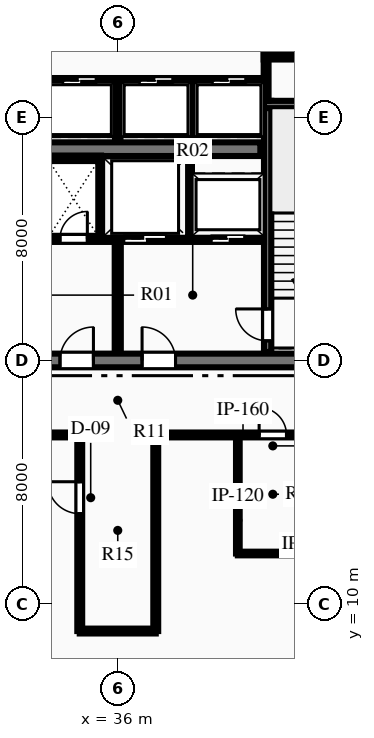
"""IFC4 building model, lengths in metres.
Left out: names, types, materials, properties, quantities, classifications, styles, units other than length and angle.
Written with IfcOpenShell. Run it as: python <this file> out.ifc"""

import sys

from ifc_helpers import new_model, si_unit, direction, frame, frame_2d, origin, place, context, subcontext, project, spatial, rectangle, extrude, element, fill, save


model = new_model("IFC4")
c1 = context("Model", 3, precision=1e-05, world=origin(), true_north=direction((0.0, 1.0)))
c2 = subcontext(c1, "Body", "Model", "MODEL_VIEW")
j1 = project(units=[si_unit("LENGTHUNIT", "METRE"), si_unit("PLANEANGLEUNIT", "RADIAN")], contexts=[c1])
p1 = place(None, origin())
s1 = spatial("IfcSite", under=j1, at=p1, CompositionType="ELEMENT")
p2 = place(p1, origin())
s2 = spatial("IfcBuilding", under=s1, at=p2, CompositionType="ELEMENT")
p3 = place(p2, frame((0.0, 0.0, 302.7)))
s3 = spatial("IfcBuildingStorey", under=s2, at=p3, CompositionType="ELEMENT", Elevation=302.7)
p4 = place(p3, frame((26.775, 18.0, 0.0), z_axis=(0.0, 0.0, 1.0), x_axis=(1.0, 0.0, 0.0)))
e1 = element("IfcWall", 1, at=p4, inside=s3, PredefinedType="SHEAR", context=c2, shape_type="SweptSolid", body=[
    extrude(rectangle(XDim=18.45, YDim=0.45, at=frame_2d((9.225, 0.0))), origin(), (0.0, 0.0, 1.0), 3.75),
])
p5 = place(p4, frame((7.325, 0.0, 0.0)))
e2 = element("IfcOpeningElement", 2, at=p5, cuts=e1, PredefinedType="OPENING", context=c2, shape_type="SweptSolid", body=[
    extrude(rectangle(XDim=1.1, YDim=2.15, at=frame_2d((0.55, 1.075))), frame((0.0, 0.235, 0.0), z_axis=(0.0, -1.0, 0.0), x_axis=(1.0, 0.0, 0.0)), (0.0, 0.0, 1.0), 0.47),
])
p6 = place(p4, frame((10.025, 0.0, 0.0)))
e3 = element("IfcOpeningElement", 3, at=p6, cuts=e1, PredefinedType="OPENING", context=c2, shape_type="SweptSolid", body=[
    extrude(rectangle(XDim=1.1, YDim=2.15, at=frame_2d((0.55, 1.075))), frame((0.0, 0.235, 0.0), z_axis=(0.0, -1.0, 0.0), x_axis=(1.0, 0.0, 0.0)), (0.0, 0.0, 1.0), 0.47),
])
p7 = place(p3, frame((31.31, 24.95, 0.0), z_axis=(0.0, 0.0, 1.0), x_axis=(1.0, 0.0, 0.0)))
e4 = element("IfcWall", 4, at=p7, inside=s3, PredefinedType="SHEAR", context=c2, shape_type="SweptSolid", body=[
    extrude(rectangle(XDim=9.38, YDim=0.45, at=frame_2d((4.69, 0.0))), origin(), (0.0, 0.0, 1.0), 3.75),
])
p8 = place(p3, frame((40.93, 18.28, 0.0), z_axis=(0.0, 0.0, 1.0), x_axis=(0.0, 1.0, 0.0)))
e5 = element("IfcWall", 5, at=p8, inside=s3, PredefinedType="SHEAR", context=c2, shape_type="SweptSolid", body=[
    extrude(rectangle(XDim=8.26, YDim=0.24, at=frame_2d((4.13, 0.0))), origin(), (0.0, 0.0, 1.0), 3.75),
])
p9 = place(p8, frame((0.365, 0.0, 0.0)))
e6 = element("IfcOpeningElement", 6, at=p9, cuts=e5, PredefinedType="OPENING", context=c2, shape_type="SweptSolid", body=[
    extrude(rectangle(XDim=1.05, YDim=2.15, at=frame_2d((0.525, 1.075))), frame((0.0, 0.13, 0.0), z_axis=(0.0, -1.0, 0.0), x_axis=(1.0, 0.0, 0.0)), (0.0, 0.0, 1.0), 0.26),
])
p10 = place(p3, frame((40.81, 26.42, 0.0), z_axis=(0.0, 0.0, 1.0), x_axis=(1.0, 0.0, 0.0)))
e7 = element("IfcWall", 7, at=p10, inside=s3, PredefinedType="SHEAR", context=c2, shape_type="SweptSolid", body=[
    extrude(rectangle(XDim=3.98, YDim=0.24, at=frame_2d((1.99, 0.0))), origin(), (0.0, 0.0, 1.0), 3.75),
])
p11 = place(p3, frame((36.0, 18.28, 0.0), z_axis=(0.0, 0.0, 1.0), x_axis=(0.0, 1.0, 0.0)))
e8 = element("IfcWall", 8, at=p11, inside=s3, PredefinedType="PARTITIONING", context=c2, shape_type="SweptSolid", body=[
    extrude(rectangle(XDim=3.77, YDim=0.2, at=frame_2d((1.885, 0.0))), origin(), (0.0, 0.0, 1.0), 3.49),
])
p12 = place(p3, frame((31.19, 22.0, 0.0), z_axis=(0.0, 0.0, 1.0), x_axis=(1.0, 0.0, 0.0)))
e9 = element("IfcWall", 9, at=p12, inside=s3, PredefinedType="PARTITIONING", context=c2, shape_type="SweptSolid", body=[
    extrude(rectangle(XDim=4.69, YDim=0.2, at=frame_2d((2.345, 0.0))), origin(), (0.0, 0.0, 1.0), 3.49),
])
p13 = place(p12, frame((2.91, 0.0, 0.0)))
e10 = element("IfcOpeningElement", 10, at=p13, cuts=e9, PredefinedType="OPENING", context=c2, shape_type="SweptSolid", body=[
    extrude(rectangle(XDim=0.9, YDim=2.15, at=frame_2d((0.45, 1.075))), frame((0.0, 0.11, 0.0), z_axis=(0.0, -1.0, 0.0), x_axis=(1.0, 0.0, 0.0)), (0.0, 0.0, 1.0), 0.22),
])
p14 = place(p12, frame((0.635, 0.0, 0.0)))
e11 = element("IfcOpeningElement", 11, at=p14, cuts=e9, PredefinedType="OPENING", context=c2, shape_type="SweptSolid", body=[
    extrude(rectangle(XDim=1.1, YDim=2.15, at=frame_2d((0.55, 1.075))), frame((0.0, 0.11, 0.0), z_axis=(0.0, -1.0, 0.0), x_axis=(1.0, 0.0, 0.0)), (0.0, 0.0, 1.0), 0.22),
])
p15 = place(p3, frame((36.12, 22.0, 0.0), z_axis=(0.0, 0.0, 1.0), x_axis=(1.0, 0.0, 0.0)))
e12 = element("IfcWall", 12, at=p15, inside=s3, PredefinedType="PARTITIONING", context=c2, shape_type="SweptSolid", body=[
    extrude(rectangle(XDim=4.69, YDim=0.2, at=frame_2d((2.345, 0.0))), origin(), (0.0, 0.0, 1.0), 3.49),
])
p16 = place(p15, frame((2.955, 0.0, 0.0)))
e13 = element("IfcOpeningElement", 13, at=p16, cuts=e12, PredefinedType="OPENING", context=c2, shape_type="SweptSolid", body=[
    extrude(rectangle(XDim=1.1, YDim=2.15, at=frame_2d((0.55, 1.075))), frame((0.0, 0.11, 0.0), z_axis=(0.0, -1.0, 0.0), x_axis=(1.0, 0.0, 0.0)), (0.0, 0.0, 1.0), 0.22),
])
p17 = place(p15, frame((0.08, 0.0, 0.0)))
e14 = element("IfcOpeningElement", 14, at=p17, cuts=e12, PredefinedType="OPENING", context=c2, shape_type="SweptSolid", body=[
    extrude(rectangle(XDim=1.4, YDim=2.2, at=frame_2d((0.7, 1.1))), frame((0.0, 0.11, 0.0), z_axis=(0.0, -1.0, 0.0), x_axis=(1.0, 0.0, 0.0)), (0.0, 0.0, 1.0), 0.22),
])
p18 = place(p3, frame((35.45, 22.05, 0.0), z_axis=(0.0, 0.0, 1.0), x_axis=(0.0, 1.0, 0.0)))
e15 = element("IfcWall", 15, at=p18, inside=s3, PredefinedType="PARTITIONING", context=c2, shape_type="SweptSolid", body=[
    extrude(rectangle(XDim=2.6, YDim=0.18, at=frame_2d((1.3, 0.0))), origin(), (0.0, 0.0, 1.0), 3.49),
])
p19 = place(p3, frame((33.65, 24.65, 0.0), z_axis=(0.0, 0.0, 1.0), x_axis=(1.0, 0.0, 0.0)))
e16 = element("IfcWall", 16, at=p19, inside=s3, PredefinedType="PARTITIONING", context=c2, shape_type="SweptSolid", body=[
    extrude(rectangle(XDim=1.8, YDim=0.18, at=frame_2d((0.9, 0.0))), origin(), (0.0, 0.0, 1.0), 3.49),
])
p20 = place(p3, frame((38.35, 22.05, 0.0), z_axis=(0.0, 0.0, 1.0), x_axis=(0.0, 1.0, 0.0)))
e17 = element("IfcWall", 17, at=p20, inside=s3, PredefinedType="PARTITIONING", context=c2, shape_type="SweptSolid", body=[
    extrude(rectangle(XDim=2.6, YDim=0.18, at=frame_2d((1.3, 0.0))), origin(), (0.0, 0.0, 1.0), 3.49),
])
p21 = place(p3, frame((40.8, 27.98, 0.0), z_axis=(0.0, 0.0, 1.0), x_axis=(1.0, 0.0, 0.0)))
e18 = element("IfcWall", 18, at=p21, inside=s3, PredefinedType="PARTITIONING", context=c2, shape_type="SweptSolid", body=[
    extrude(rectangle(XDim=4.05, YDim=0.16, at=frame_2d((2.025, 0.0))), origin(), (0.0, 0.0, 1.0), 3.49),
])
p22 = place(p21, frame((1.475, 0.0, 0.0)))
e19 = element("IfcOpeningElement", 19, at=p22, cuts=e18, PredefinedType="OPENING", context=c2, shape_type="SweptSolid", body=[
    extrude(rectangle(XDim=0.95, YDim=2.15, at=frame_2d((0.475, 1.075))), frame((0.0, 0.09, 0.0), z_axis=(0.0, -1.0, 0.0), x_axis=(1.0, 0.0, 0.0)), (0.0, 0.0, 1.0), 0.18),
])
p23 = place(p3, frame((40.88, 26.54, 0.0), z_axis=(0.0, 0.0, 1.0), x_axis=(0.0, 1.0, 0.0)))
e20 = element("IfcWall", 20, at=p23, inside=s3, PredefinedType="PARTITIONING", context=c2, shape_type="SweptSolid", body=[
    extrude(rectangle(XDim=1.51, YDim=0.16, at=frame_2d((0.755, 0.0))), origin(), (0.0, 0.0, 1.0), 3.49),
])
p24 = place(p3, frame((31.2, 27.2, 0.0), z_axis=(0.0, 0.0, 1.0), x_axis=(1.0, 0.0, 0.0)))
e21 = element("IfcWall", 21, at=p24, inside=s3, PredefinedType="PARTITIONING", context=c2, shape_type="SweptSolid", body=[
    extrude(rectangle(XDim=9.6, YDim=0.18, at=frame_2d((4.8, 0.0))), origin(), (0.0, 0.0, 1.0), 3.49),
])
p25 = place(p24, frame((0.59, 0.0, 0.0)))
e22 = element("IfcOpeningElement", 22, at=p25, cuts=e21, PredefinedType="OPENING", context=c2, shape_type="SweptSolid", body=[
    extrude(rectangle(XDim=1.1, YDim=2.15, at=frame_2d((0.55, 1.075))), frame((0.0, 0.1, 0.0), z_axis=(0.0, -1.0, 0.0), x_axis=(1.0, 0.0, 0.0)), (0.0, 0.0, 1.0), 0.2),
])
p26 = place(p24, frame((2.99, 0.0, 0.0)))
e23 = element("IfcOpeningElement", 23, at=p26, cuts=e21, PredefinedType="OPENING", context=c2, shape_type="SweptSolid", body=[
    extrude(rectangle(XDim=1.1, YDim=2.15, at=frame_2d((0.55, 1.075))), frame((0.0, 0.1, 0.0), z_axis=(0.0, -1.0, 0.0), x_axis=(1.0, 0.0, 0.0)), (0.0, 0.0, 1.0), 0.2),
])
p27 = place(p24, frame((5.51, 0.0, 0.0)))
e24 = element("IfcOpeningElement", 24, at=p27, cuts=e21, PredefinedType="OPENING", context=c2, shape_type="SweptSolid", body=[
    extrude(rectangle(XDim=1.1, YDim=2.15, at=frame_2d((0.55, 1.075))), frame((0.0, 0.1, 0.0), z_axis=(0.0, -1.0, 0.0), x_axis=(1.0, 0.0, 0.0)), (0.0, 0.0, 1.0), 0.2),
])
p28 = place(p24, frame((7.91, 0.0, 0.0)))
e25 = element("IfcOpeningElement", 25, at=p28, cuts=e21, PredefinedType="OPENING", context=c2, shape_type="SweptSolid", body=[
    extrude(rectangle(XDim=1.1, YDim=2.15, at=frame_2d((0.55, 1.075))), frame((0.0, 0.1, 0.0), z_axis=(0.0, -1.0, 0.0), x_axis=(1.0, 0.0, 0.0)), (0.0, 0.0, 1.0), 0.2),
])
for number, where, z_axis, x_axis in (
    (26, (36.0, 25.3, 0.0), (0.0, 0.0, 1.0), (0.0, 1.0, 0.0)),
    (27, (38.46, 25.3, 0.0), (0.0, 0.0, 1.0), (0.0, 1.0, 0.0)),
):
    element("IfcWall", number, at=place(p3, frame(where, z_axis=z_axis, x_axis=x_axis)), inside=s3, PredefinedType="PARTITIONING", context=c2, shape_type="SweptSolid", body=[
        extrude(rectangle(XDim=1.9, YDim=0.18, at=frame_2d((0.95, 0.0))), origin(), (0.0, 0.0, 1.0), 3.49),
    ])
p29 = place(p3, frame((24.5, 15.55, 0.0), z_axis=(0.0, 0.0, 1.0), x_axis=(1.0, 0.0, 0.0)))
e28 = element("IfcWall", 28, at=p29, inside=s3, PredefinedType="PARTITIONING", context=c2, shape_type="SweptSolid", body=[
    extrude(rectangle(XDim=10.25, YDim=0.16, at=frame_2d((5.125, 0.0))), origin(), (0.0, 0.0, 1.0), 3.49),
])
p30 = place(p29, frame((4.675, 0.0, 0.0)))
e29 = element("IfcOpeningElement", 29, at=p30, cuts=e28, PredefinedType="OPENING", context=c2, shape_type="SweptSolid", body=[
    extrude(rectangle(XDim=1.05, YDim=2.15, at=frame_2d((0.525, 1.075))), frame((0.0, 0.09, 0.0), z_axis=(0.0, -1.0, 0.0), x_axis=(1.0, 0.0, 0.0)), (0.0, 0.0, 1.0), 0.18),
])
p31 = place(p3, frame((37.25, 15.55, 0.0), z_axis=(0.0, 0.0, 1.0), x_axis=(1.0, 0.0, 0.0)))
e30 = element("IfcWall", 30, at=p31, inside=s3, PredefinedType="PARTITIONING", context=c2, shape_type="SweptSolid", body=[
    extrude(rectangle(XDim=10.25, YDim=0.16, at=frame_2d((5.125, 0.0))), origin(), (0.0, 0.0, 1.0), 3.49),
])
p32 = place(p31, frame((3.4, 0.0, 0.0)))
e31 = element("IfcOpeningElement", 31, at=p32, cuts=e30, PredefinedType="OPENING", context=c2, shape_type="SweptSolid", body=[
    extrude(rectangle(XDim=0.9, YDim=2.15, at=frame_2d((0.45, 1.075))), frame((0.0, 0.09, 0.0), z_axis=(0.0, -1.0, 0.0), x_axis=(1.0, 0.0, 0.0)), (0.0, 0.0, 1.0), 0.18),
])
p33 = place(p31, frame((5.7, 0.0, 0.0)))
e32 = element("IfcOpeningElement", 32, at=p33, cuts=e30, PredefinedType="OPENING", context=c2, shape_type="SweptSolid", body=[
    extrude(rectangle(XDim=0.9, YDim=2.15, at=frame_2d((0.45, 1.075))), frame((0.0, 0.09, 0.0), z_axis=(0.0, -1.0, 0.0), x_axis=(1.0, 0.0, 0.0)), (0.0, 0.0, 1.0), 0.18),
])
p34 = place(p31, frame((7.95, 0.0, 0.0)))
e33 = element("IfcOpeningElement", 33, at=p34, cuts=e30, PredefinedType="OPENING", context=c2, shape_type="SweptSolid", body=[
    extrude(rectangle(XDim=1.0, YDim=2.15, at=frame_2d((0.5, 1.075))), frame((0.0, 0.09, 0.0), z_axis=(0.0, -1.0, 0.0), x_axis=(1.0, 0.0, 0.0)), (0.0, 0.0, 1.0), 0.18),
])
p35 = place(p3, frame((34.75, 9.1, 0.0), z_axis=(0.0, 0.0, 1.0), x_axis=(0.0, 1.0, 0.0)))
e34 = element("IfcWall", 34, at=p35, inside=s3, PredefinedType="PARTITIONING", context=c2, shape_type="SweptSolid", body=[
    extrude(rectangle(XDim=6.45, YDim=0.16, at=frame_2d((3.225, 0.0))), origin(), (0.0, 0.0, 1.0), 3.49),
])
p36 = place(p35, frame((3.861, 0.0, 0.0)))
e35 = element("IfcOpeningElement", 35, at=p36, cuts=e34, PredefinedType="OPENING", context=c2, shape_type="SweptSolid", body=[
    extrude(rectangle(XDim=1.05, YDim=2.15, at=frame_2d((0.525, 1.075))), frame((0.0, 0.09, 0.0), z_axis=(0.0, -1.0, 0.0), x_axis=(1.0, 0.0, 0.0)), (0.0, 0.0, 1.0), 0.18),
])
p37 = place(p3, frame((37.25, 9.1, 0.0), z_axis=(0.0, 0.0, 1.0), x_axis=(0.0, 1.0, 0.0)))
e36 = element("IfcWall", 36, at=p37, inside=s3, PredefinedType="PARTITIONING", context=c2, shape_type="SweptSolid", body=[
    extrude(rectangle(XDim=6.45, YDim=0.16, at=frame_2d((3.225, 0.0))), origin(), (0.0, 0.0, 1.0), 3.49),
])
p38 = place(p3, frame((34.75, 9.1, 0.0), z_axis=(0.0, 0.0, 1.0), x_axis=(1.0, 0.0, 0.0)))
e37 = element("IfcWall", 37, at=p38, inside=s3, PredefinedType="PARTITIONING", context=c2, shape_type="SweptSolid", body=[
    extrude(rectangle(XDim=2.5, YDim=0.16, at=frame_2d((1.25, 0.0))), origin(), (0.0, 0.0, 1.0), 3.49),
])
p39 = place(p3, frame((39.95, 11.65, 0.0), z_axis=(0.0, 0.0, 1.0), x_axis=(0.0, 1.0, 0.0)))
e38 = element("IfcWall", 38, at=p39, inside=s3, PredefinedType="PARTITIONING", context=c2, shape_type="SweptSolid", body=[
    extrude(rectangle(XDim=3.9, YDim=0.12, at=frame_2d((1.95, 0.0))), origin(), (0.0, 0.0, 1.0), 3.49),
])
p40 = place(p3, frame((39.95, 11.65, 0.0), z_axis=(0.0, 0.0, 1.0), x_axis=(1.0, 0.0, 0.0)))
e39 = element("IfcWall", 39, at=p40, inside=s3, PredefinedType="PARTITIONING", context=c2, shape_type="SweptSolid", body=[
    extrude(rectangle(XDim=6.9, YDim=0.12, at=frame_2d((3.45, 0.0))), origin(), (0.0, 0.0, 1.0), 3.49),
])
p41 = place(p9, origin())
e40 = element("IfcDoor", 40, at=p41, inside=s3, OperationType="SINGLE_SWING_RIGHT", PredefinedType="DOOR", context=c2, shape_type="SweptSolid", body=[
    extrude(rectangle(XDim=1.05, YDim=2.15, at=frame_2d((0.525, 1.075))), frame((0.0, 0.025, 0.0), z_axis=(0.0, -1.0, 0.0), x_axis=(1.0, 0.0, 0.0)), (0.0, 0.0, 1.0), 0.05),
])
fill(e6, e40)
p42 = place(p5, origin())
e41 = element("IfcDoor", 41, at=p42, inside=s3, OperationType="SINGLE_SWING_RIGHT", PredefinedType="DOOR", context=c2, shape_type="SweptSolid", body=[
    extrude(rectangle(XDim=1.1, YDim=2.15, at=frame_2d((0.55, 1.075))), frame((0.0, 0.025, 0.0), z_axis=(0.0, -1.0, 0.0), x_axis=(1.0, 0.0, 0.0)), (0.0, 0.0, 1.0), 0.05),
])
fill(e2, e41)
p43 = place(p6, origin())
e42 = element("IfcDoor", 42, at=p43, inside=s3, OperationType="SINGLE_SWING_LEFT", PredefinedType="DOOR", context=c2, shape_type="SweptSolid", body=[
    extrude(rectangle(XDim=1.1, YDim=2.15, at=frame_2d((0.55, 1.075))), frame((0.0, 0.025, 0.0), z_axis=(0.0, -1.0, 0.0), x_axis=(1.0, 0.0, 0.0)), (0.0, 0.0, 1.0), 0.05),
])
fill(e3, e42)
p44 = place(p13, origin())
e43 = element("IfcDoor", 43, at=p44, inside=s3, OperationType="SINGLE_SWING_RIGHT", PredefinedType="DOOR", context=c2, shape_type="SweptSolid", body=[
    extrude(rectangle(XDim=0.9, YDim=2.15, at=frame_2d((0.45, 1.075))), frame((0.0, 0.025, 0.0), z_axis=(0.0, -1.0, 0.0), x_axis=(1.0, 0.0, 0.0)), (0.0, 0.0, 1.0), 0.05),
])
fill(e10, e43)
p45 = place(p32, origin())
e44 = element("IfcDoor", 44, at=p45, inside=s3, OperationType="SINGLE_SWING_LEFT", PredefinedType="DOOR", context=c2, shape_type="SweptSolid", body=[
    extrude(rectangle(XDim=0.9, YDim=2.15, at=frame_2d((0.45, 1.075))), frame((0.0, 0.025, 0.0), z_axis=(0.0, -1.0, 0.0), x_axis=(1.0, 0.0, 0.0)), (0.0, 0.0, 1.0), 0.05),
])
fill(e31, e44)
p46 = place(p36, origin())
e45 = element("IfcDoor", 45, at=p46, inside=s3, OperationType="SINGLE_SWING_RIGHT", PredefinedType="DOOR", context=c2, shape_type="SweptSolid", body=[
    extrude(rectangle(XDim=1.05, YDim=2.15, at=frame_2d((0.525, 1.075))), frame((0.0, 0.025, 0.0), z_axis=(0.0, -1.0, 0.0), x_axis=(1.0, 0.0, 0.0)), (0.0, 0.0, 1.0), 0.05),
])
fill(e35, e45)
p47 = place(p26, origin())
e46 = element("IfcDoor", 46, at=p47, inside=s3, OperationType="SLIDING_TO_LEFT", PredefinedType="DOOR", context=c2, shape_type="SweptSolid", body=[
    extrude(rectangle(XDim=1.1, YDim=2.15, at=frame_2d((0.55, 1.075))), frame((0.0, 0.025, 0.0), z_axis=(0.0, -1.0, 0.0), x_axis=(1.0, 0.0, 0.0)), (0.0, 0.0, 1.0), 0.05),
])
fill(e23, e46)
p48 = place(p27, origin())
e47 = element("IfcDoor", 47, at=p48, inside=s3, OperationType="SLIDING_TO_LEFT", PredefinedType="DOOR", context=c2, shape_type="SweptSolid", body=[
    extrude(rectangle(XDim=1.1, YDim=2.15, at=frame_2d((0.55, 1.075))), frame((0.0, 0.025, 0.0), z_axis=(0.0, -1.0, 0.0), x_axis=(1.0, 0.0, 0.0)), (0.0, 0.0, 1.0), 0.05),
])
fill(e24, e47)
p49 = place(p28, origin())
e48 = element("IfcDoor", 48, at=p49, inside=s3, OperationType="SLIDING_TO_LEFT", PredefinedType="DOOR", context=c2, shape_type="SweptSolid", body=[
    extrude(rectangle(XDim=1.1, YDim=2.15, at=frame_2d((0.55, 1.075))), frame((0.0, 0.025, 0.0), z_axis=(0.0, -1.0, 0.0), x_axis=(1.0, 0.0, 0.0)), (0.0, 0.0, 1.0), 0.05),
])
fill(e25, e48)
p50 = place(p16, origin())
e49 = element("IfcDoor", 49, at=p50, inside=s3, OperationType="SLIDING_TO_LEFT", PredefinedType="DOOR", context=c2, shape_type="SweptSolid", body=[
    extrude(rectangle(XDim=1.1, YDim=2.15, at=frame_2d((0.55, 1.075))), frame((0.0, 0.025, 0.0), z_axis=(0.0, -1.0, 0.0), x_axis=(1.0, 0.0, 0.0)), (0.0, 0.0, 1.0), 0.05),
])
fill(e13, e49)
p51 = place(p17, origin())
e50 = element("IfcDoor", 50, at=p51, inside=s3, OperationType="SLIDING_TO_LEFT", PredefinedType="DOOR", context=c2, shape_type="SweptSolid", body=[
    extrude(rectangle(XDim=1.4, YDim=2.2, at=frame_2d((0.7, 1.1))), frame((0.0, 0.025, 0.0), z_axis=(0.0, -1.0, 0.0), x_axis=(1.0, 0.0, 0.0)), (0.0, 0.0, 1.0), 0.05),
])
fill(e14, e50)
save(model, sys.argv[1])
